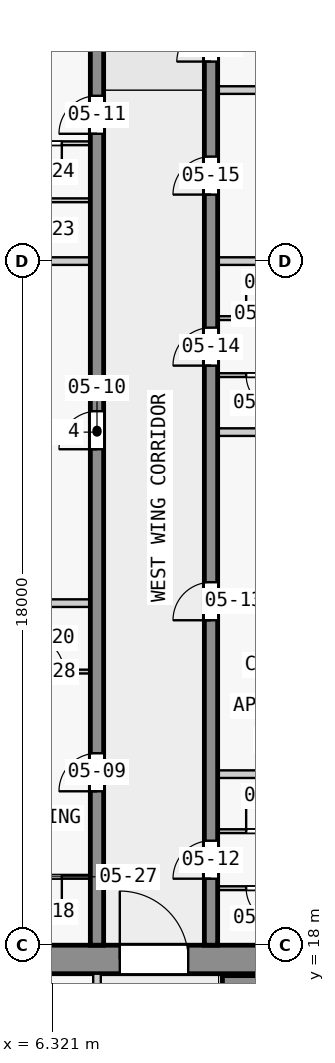
"""IFC4 building model, lengths in metres.
Left out: names, types, materials, properties, quantities, classifications, styles, units other than length and angle.
Written with IfcOpenShell. Run it as: python <this file> out.ifc"""

import sys

from ifc_helpers import new_model, si_unit, direction, frame, frame_2d, origin, place, context, subcontext, project, spatial, rectangle, extrude, element, fill, save


model = new_model("IFC4")
c1 = context("Model", 3, precision=1e-05, world=origin(), true_north=direction((0.0, 1.0)))
c2 = subcontext(c1, "Body", "Model", "MODEL_VIEW")
j1 = project(units=[si_unit("LENGTHUNIT", "METRE"), si_unit("PLANEANGLEUNIT", "RADIAN")], contexts=[c1])
p1 = place(None, origin())
s1 = spatial("IfcSite", under=j1, at=p1, CompositionType="ELEMENT")
p2 = place(p1, origin())
s2 = spatial("IfcBuilding", under=s1, at=p2, CompositionType="ELEMENT")
p3 = place(p2, frame((0.0, 0.0, 26.8)))
s3 = spatial("IfcBuildingStorey", under=s2, at=p3, CompositionType="ELEMENT", Elevation=26.8)
p4 = place(p3, frame((1.55, 17.625, 0.0), z_axis=(0.0, 0.0, 1.0), x_axis=(1.0, 0.0, 0.0)))
e1 = element("IfcWall", 1, at=p4, inside=s3, PredefinedType="SHEAR", context=c2, shape_type="SweptSolid", body=[
    extrude(rectangle(XDim=20.95, YDim=0.75, at=frame_2d((10.475, 0.0))), origin(), (0.0, 0.0, 1.0), 3.25),
])
p5 = place(p4, frame((6.55, 0.0, 0.0)))
e2 = element("IfcOpeningElement", 2, at=p5, cuts=e1, PredefinedType="OPENING", context=c2, shape_type="SweptSolid", body=[
    extrude(rectangle(XDim=1.8, YDim=2.1, at=frame_2d((0.9, 1.05))), frame((0.0, 0.385, 0.0), z_axis=(0.0, -1.0, 0.0), x_axis=(1.0, 0.0, 0.0)), (0.0, 0.0, 1.0), 0.77),
])
p6 = place(p3, frame((10.8, 17.05, 0.0), z_axis=(0.0, 0.0, 1.0), x_axis=(1.0, 0.0, 0.0)))
e3 = element("IfcWall", 3, at=p6, inside=s3, PredefinedType="SHEAR", context=c2, shape_type="SweptSolid", body=[
    extrude(rectangle(XDim=7.8, YDim=0.3, at=frame_2d((3.9, 0.0))), origin(), (0.0, 0.0, 1.0), 3.25),
])
p7 = place(p3, frame((7.5, 18.0, 0.0), z_axis=(0.0, 0.0, 1.0), x_axis=(0.0, 1.0, 0.0)))
e4 = element("IfcWall", 4, at=p7, inside=s3, PredefinedType="SHEAR", context=c2, shape_type="SweptSolid", body=[
    extrude(rectangle(XDim=27.0, YDim=0.35, at=frame_2d((13.5, 0.0))), origin(), (0.0, 0.0, 1.0), 3.25),
])
p8 = place(p7, frame((4.05, 0.0, 0.0)))
e5 = element("IfcOpeningElement", 5, at=p8, cuts=e4, PredefinedType="OPENING", context=c2, shape_type="SweptSolid", body=[
    extrude(rectangle(XDim=1.0, YDim=2.1, at=frame_2d((0.5, 1.05))), frame((0.0, 0.185, 0.0), z_axis=(0.0, -1.0, 0.0), x_axis=(1.0, 0.0, 0.0)), (0.0, 0.0, 1.0), 0.37),
])
p9 = place(p7, frame((13.05, 0.0, 0.0)))
e6 = element("IfcOpeningElement", 6, at=p9, cuts=e4, PredefinedType="OPENING", context=c2, shape_type="SweptSolid", body=[
    extrude(rectangle(XDim=1.0, YDim=2.1, at=frame_2d((0.5, 1.05))), frame((0.0, 0.185, 0.0), z_axis=(0.0, -1.0, 0.0), x_axis=(1.0, 0.0, 0.0)), (0.0, 0.0, 1.0), 0.37),
])
p10 = place(p7, frame((21.35, 0.0, 0.0)))
e7 = element("IfcOpeningElement", 7, at=p10, cuts=e4, PredefinedType="OPENING", context=c2, shape_type="SweptSolid", body=[
    extrude(rectangle(XDim=1.0, YDim=2.1, at=frame_2d((0.5, 1.05))), frame((0.0, 0.185, 0.0), z_axis=(0.0, -1.0, 0.0), x_axis=(1.0, 0.0, 0.0)), (0.0, 0.0, 1.0), 0.37),
])
p11 = place(p3, frame((10.5, 18.0, 0.0), z_axis=(0.0, 0.0, 1.0), x_axis=(0.0, 1.0, 0.0)))
e8 = element("IfcWall", 8, at=p11, inside=s3, PredefinedType="SHEAR", context=c2, shape_type="SweptSolid", body=[
    extrude(rectangle(XDim=27.0, YDim=0.35, at=frame_2d((13.5, 0.0))), origin(), (0.0, 0.0, 1.0), 3.25),
])
p12 = place(p11, frame((1.75, 0.0, 0.0)))
e9 = element("IfcOpeningElement", 9, at=p12, cuts=e8, PredefinedType="OPENING", context=c2, shape_type="SweptSolid", body=[
    extrude(rectangle(XDim=1.0, YDim=2.1, at=frame_2d((0.5, 1.05))), frame((0.0, 0.185, 0.0), z_axis=(0.0, -1.0, 0.0), x_axis=(1.0, 0.0, 0.0)), (0.0, 0.0, 1.0), 0.37),
])
p13 = place(p11, frame((8.55, 0.0, 0.0)))
e10 = element("IfcOpeningElement", 10, at=p13, cuts=e8, PredefinedType="OPENING", context=c2, shape_type="SweptSolid", body=[
    extrude(rectangle(XDim=1.0, YDim=2.1, at=frame_2d((0.5, 1.05))), frame((0.0, 0.185, 0.0), z_axis=(0.0, -1.0, 0.0), x_axis=(1.0, 0.0, 0.0)), (0.0, 0.0, 1.0), 0.37),
])
p14 = place(p11, frame((15.25, 0.0, 0.0)))
e11 = element("IfcOpeningElement", 11, at=p14, cuts=e8, PredefinedType="OPENING", context=c2, shape_type="SweptSolid", body=[
    extrude(rectangle(XDim=1.0, YDim=2.1, at=frame_2d((0.5, 1.05))), frame((0.0, 0.185, 0.0), z_axis=(0.0, -1.0, 0.0), x_axis=(1.0, 0.0, 0.0)), (0.0, 0.0, 1.0), 0.37),
])
p15 = place(p11, frame((19.75, 0.0, 0.0)))
e12 = element("IfcOpeningElement", 12, at=p15, cuts=e8, PredefinedType="OPENING", context=c2, shape_type="SweptSolid", body=[
    extrude(rectangle(XDim=1.0, YDim=2.1, at=frame_2d((0.5, 1.05))), frame((0.0, 0.185, 0.0), z_axis=(0.0, -1.0, 0.0), x_axis=(1.0, 0.0, 0.0)), (0.0, 0.0, 1.0), 0.37),
])
p16 = place(p11, frame((23.25, 0.0, 0.0)))
e13 = element("IfcOpeningElement", 13, at=p16, cuts=e8, PredefinedType="OPENING", context=c2, shape_type="SweptSolid", body=[
    extrude(rectangle(XDim=0.9, YDim=2.1, at=frame_2d((0.45, 1.05))), frame((0.0, 0.185, 0.0), z_axis=(0.0, -1.0, 0.0), x_axis=(1.0, 0.0, 0.0)), (0.0, 0.0, 1.0), 0.37),
])
p17 = place(p11, frame((25.45, 0.0, 0.0)))
e14 = element("IfcOpeningElement", 14, at=p17, cuts=e8, PredefinedType="OPENING", context=c2, shape_type="SweptSolid", body=[
    extrude(rectangle(XDim=1.0, YDim=2.1, at=frame_2d((0.5, 1.05))), frame((0.0, 0.185, 0.0), z_axis=(0.0, -1.0, 0.0), x_axis=(1.0, 0.0, 0.0)), (0.0, 0.0, 1.0), 0.37),
])
p18 = place(p3, frame((7.5, 10.1, 0.0), z_axis=(0.0, 0.0, 1.0), x_axis=(0.0, 1.0, 0.0)))
e15 = element("IfcWall", 15, at=p18, inside=s3, PredefinedType="PARTITIONING", context=c2, shape_type="SweptSolid", body=[
    extrude(rectangle(XDim=7.15, YDim=0.2, at=frame_2d((3.575, 0.0))), origin(), (0.0, 0.0, 1.0), 3.25),
])
p19 = place(p18, frame((1.05, 0.0, 0.0)))
e16 = element("IfcOpeningElement", 16, at=p19, cuts=e15, PredefinedType="OPENING", context=c2, shape_type="SweptSolid", body=[
    extrude(rectangle(XDim=0.9, YDim=2.1, at=frame_2d((0.45, 1.05))), frame((0.0, 0.11, 0.0), z_axis=(0.0, -1.0, 0.0), x_axis=(1.0, 0.0, 0.0)), (0.0, 0.0, 1.0), 0.22),
])
p20 = place(p18, frame((4.625, 0.0, 0.0)))
e17 = element("IfcOpeningElement", 17, at=p20, cuts=e15, PredefinedType="OPENING", context=c2, shape_type="SweptSolid", body=[
    extrude(rectangle(XDim=0.9, YDim=2.1, at=frame_2d((0.45, 1.05))), frame((0.0, 0.11, 0.0), z_axis=(0.0, -1.0, 0.0), x_axis=(1.0, 0.0, 0.0)), (0.0, 0.0, 1.0), 0.22),
])
p21 = place(p3, frame((13.075, 19.5, 0.0), z_axis=(0.0, 0.0, 1.0), x_axis=(-1.0, 0.0, 0.0)))
e18 = element("IfcWall", 18, at=p21, inside=s3, PredefinedType="PARTITIONING", context=c2, shape_type="SweptSolid", body=[
    extrude(rectangle(XDim=2.4, YDim=0.1, at=frame_2d((1.2, 0.0))), origin(), (0.0, 0.0, 1.0), 3.25),
])
p22 = place(p21, frame((0.75, 0.0, 0.0)))
e19 = element("IfcOpeningElement", 19, at=p22, cuts=e18, PredefinedType="OPENING", context=c2, shape_type="SweptSolid", body=[
    extrude(rectangle(XDim=0.9, YDim=2.1, at=frame_2d((0.45, 1.05))), frame((0.0, 0.06, 0.0), z_axis=(0.0, -1.0, 0.0), x_axis=(1.0, 0.0, 0.0)), (0.0, 0.0, 1.0), 0.12),
])
p23 = place(p3, frame((7.325, 19.8, 0.0), z_axis=(0.0, 0.0, 1.0), x_axis=(-1.0, 0.0, 0.0)))
e20 = element("IfcWall", 20, at=p23, inside=s3, PredefinedType="PARTITIONING", context=c2, shape_type="SweptSolid", body=[
    extrude(rectangle(XDim=2.4, YDim=0.1, at=frame_2d((1.2, 0.0))), origin(), (0.0, 0.0, 1.0), 3.25),
])
p24 = place(p23, frame((0.75, 0.0, 0.0)))
e21 = element("IfcOpeningElement", 21, at=p24, cuts=e20, PredefinedType="OPENING", context=c2, shape_type="SweptSolid", body=[
    extrude(rectangle(XDim=0.9, YDim=2.1, at=frame_2d((0.45, 1.05))), frame((0.0, 0.06, 0.0), z_axis=(0.0, -1.0, 0.0), x_axis=(1.0, 0.0, 0.0)), (0.0, 0.0, 1.0), 0.12),
])
p25 = place(p3, frame((10.675, 21.0, 0.0), z_axis=(0.0, 0.0, 1.0), x_axis=(1.0, 0.0, 0.0)))
e22 = element("IfcWall", 22, at=p25, inside=s3, PredefinedType="PARTITIONING", context=c2, shape_type="SweptSolid", body=[
    extrude(rectangle(XDim=2.4, YDim=0.1, at=frame_2d((1.2, 0.0))), origin(), (0.0, 0.0, 1.0), 3.25),
])
p26 = place(p25, frame((0.75, 0.0, 0.0)))
e23 = element("IfcOpeningElement", 23, at=p26, cuts=e22, PredefinedType="OPENING", context=c2, shape_type="SweptSolid", body=[
    extrude(rectangle(XDim=0.9, YDim=2.1, at=frame_2d((0.45, 1.05))), frame((0.0, 0.06, 0.0), z_axis=(0.0, -1.0, 0.0), x_axis=(1.0, 0.0, 0.0)), (0.0, 0.0, 1.0), 0.12),
])
p27 = place(p3, frame((12.975, 22.5, 0.0), z_axis=(0.0, 0.0, 1.0), x_axis=(-1.0, 0.0, 0.0)))
e24 = element("IfcWall", 24, at=p27, inside=s3, PredefinedType="PARTITIONING", context=c2, shape_type="SweptSolid", body=[
    extrude(rectangle(XDim=2.3, YDim=0.2, at=frame_2d((1.15, 0.0))), origin(), (0.0, 0.0, 1.0), 3.25),
])
p28 = place(p3, frame((4.975, 25.2, 0.0), z_axis=(0.0, 0.0, 1.0), x_axis=(1.0, 0.0, 0.0)))
e25 = element("IfcWall", 25, at=p28, inside=s3, PredefinedType="PARTITIONING", context=c2, shape_type="SweptSolid", body=[
    extrude(rectangle(XDim=2.35, YDim=0.1, at=frame_2d((1.175, 0.0))), origin(), (0.0, 0.0, 1.0), 3.25),
])
p29 = place(p28, frame((0.75, 0.0, 0.0)))
e26 = element("IfcOpeningElement", 26, at=p29, cuts=e25, PredefinedType="OPENING", context=c2, shape_type="SweptSolid", body=[
    extrude(rectangle(XDim=0.9, YDim=2.1, at=frame_2d((0.45, 1.05))), frame((0.0, 0.06, 0.0), z_axis=(0.0, -1.0, 0.0), x_axis=(1.0, 0.0, 0.0)), (0.0, 0.0, 1.0), 0.12),
])
for number, where, z_axis, x_axis in (
    (27, (7.325, 27.0, 0.0), (0.0, 0.0, 1.0), (-1.0, 0.0, 0.0)),
    (28, (18.08, 31.5, 0.0), (0.0, 0.0, 1.0), (-1.0, 0.0, 0.0)),
):
    element("IfcWall", number, at=place(p3, frame(where, z_axis=z_axis, x_axis=x_axis)), inside=s3, PredefinedType="PARTITIONING", context=c2, shape_type="SweptSolid", body=[
        extrude(rectangle(XDim=7.405, YDim=0.2, at=frame_2d((3.703, 0.0))), origin(), (0.0, 0.0, 1.0), 3.25),
    ])
p30 = place(p3, frame((13.075, 33.0, 0.0), z_axis=(0.0, 0.0, 1.0), x_axis=(-1.0, 0.0, 0.0)))
e29 = element("IfcWall", 29, at=p30, inside=s3, PredefinedType="PARTITIONING", context=c2, shape_type="SweptSolid", body=[
    extrude(rectangle(XDim=2.4, YDim=0.1, at=frame_2d((1.2, 0.0))), origin(), (0.0, 0.0, 1.0), 3.25),
])
p31 = place(p30, frame((0.75, 0.0, 0.0)))
e30 = element("IfcOpeningElement", 30, at=p31, cuts=e29, PredefinedType="OPENING", context=c2, shape_type="SweptSolid", body=[
    extrude(rectangle(XDim=0.9, YDim=2.1, at=frame_2d((0.45, 1.05))), frame((0.0, 0.06, 0.0), z_axis=(0.0, -1.0, 0.0), x_axis=(1.0, 0.0, 0.0)), (0.0, 0.0, 1.0), 0.12),
])
p32 = place(p3, frame((10.675, 34.5, 0.0), z_axis=(0.0, 0.0, 1.0), x_axis=(1.0, 0.0, 0.0)))
e31 = element("IfcWall", 31, at=p32, inside=s3, PredefinedType="PARTITIONING", context=c2, shape_type="SweptSolid", body=[
    extrude(rectangle(XDim=2.4, YDim=0.1, at=frame_2d((1.2, 0.0))), origin(), (0.0, 0.0, 1.0), 3.25),
])
p33 = place(p32, frame((0.75, 0.0, 0.0)))
e32 = element("IfcOpeningElement", 32, at=p33, cuts=e31, PredefinedType="OPENING", context=c2, shape_type="SweptSolid", body=[
    extrude(rectangle(XDim=0.9, YDim=2.1, at=frame_2d((0.45, 1.05))), frame((0.0, 0.06, 0.0), z_axis=(0.0, -1.0, 0.0), x_axis=(1.0, 0.0, 0.0)), (0.0, 0.0, 1.0), 0.12),
])
p34 = place(p3, frame((7.325, 36.0, 0.0), z_axis=(0.0, 0.0, 1.0), x_axis=(-1.0, 0.0, 0.0)))
e33 = element("IfcWall", 33, at=p34, inside=s3, PredefinedType="PARTITIONING", context=c2, shape_type="SweptSolid", body=[
    extrude(rectangle(XDim=5.925, YDim=0.2, at=frame_2d((2.962, 0.0))), origin(), (0.0, 0.0, 1.0), 3.25),
])
p35 = place(p3, frame((12.975, 36.0, 0.0), z_axis=(0.0, 0.0, 1.0), x_axis=(-1.0, 0.0, 0.0)))
e34 = element("IfcWall", 34, at=p35, inside=s3, PredefinedType="PARTITIONING", context=c2, shape_type="SweptSolid", body=[
    extrude(rectangle(XDim=2.3, YDim=0.2, at=frame_2d((1.15, 0.0))), origin(), (0.0, 0.0, 1.0), 3.25),
])
p36 = place(p3, frame((7.325, 37.6, 0.0), z_axis=(0.0, 0.0, 1.0), x_axis=(-1.0, 0.0, 0.0)))
e35 = element("IfcWall", 35, at=p36, inside=s3, PredefinedType="PARTITIONING", context=c2, shape_type="SweptSolid", body=[
    extrude(rectangle(XDim=2.35, YDim=0.1, at=frame_2d((1.175, 0.0))), origin(), (0.0, 0.0, 1.0), 3.25),
])
p37 = place(p3, frame((7.325, 39.1, 0.0), z_axis=(0.0, 0.0, 1.0), x_axis=(-1.0, 0.0, 0.0)))
e36 = element("IfcWall", 36, at=p37, inside=s3, PredefinedType="PARTITIONING", context=c2, shape_type="SweptSolid", body=[
    extrude(rectangle(XDim=2.35, YDim=0.1, at=frame_2d((1.175, 0.0))), origin(), (0.0, 0.0, 1.0), 3.25),
])
p38 = place(p37, frame((0.75, 0.0, 0.0)))
e37 = element("IfcOpeningElement", 37, at=p38, cuts=e36, PredefinedType="OPENING", context=c2, shape_type="SweptSolid", body=[
    extrude(rectangle(XDim=0.9, YDim=2.1, at=frame_2d((0.45, 1.05))), frame((0.0, 0.06, 0.0), z_axis=(0.0, -1.0, 0.0), x_axis=(1.0, 0.0, 0.0)), (0.0, 0.0, 1.0), 0.12),
])
p39 = place(p3, frame((18.08, 40.5, 0.0), z_axis=(0.0, 0.0, 1.0), x_axis=(-1.0, 0.0, 0.0)))
e38 = element("IfcWall", 38, at=p39, inside=s3, PredefinedType="PARTITIONING", context=c2, shape_type="SweptSolid", body=[
    extrude(rectangle(XDim=7.405, YDim=0.2, at=frame_2d((3.703, 0.0))), origin(), (0.0, 0.0, 1.0), 3.25),
])
p40 = place(p5, origin())
e39 = element("IfcDoor", 39, at=p40, inside=s3, OperationType="DOUBLE_DOOR_SINGLE_SWING", PredefinedType="DOOR", context=c2, shape_type="SweptSolid", body=[
    extrude(rectangle(XDim=1.8, YDim=2.1, at=frame_2d((0.9, 1.05))), frame((0.0, 0.025, 0.0), z_axis=(0.0, -1.0, 0.0), x_axis=(1.0, 0.0, 0.0)), (0.0, 0.0, 1.0), 0.05),
])
fill(e2, e39)
p41 = place(p8, origin())
e40 = element("IfcDoor", 40, at=p41, inside=s3, OperationType="SINGLE_SWING_LEFT", PredefinedType="DOOR", context=c2, shape_type="SweptSolid", body=[
    extrude(rectangle(XDim=1.0, YDim=2.1, at=frame_2d((0.5, 1.05))), frame((0.0, 0.025, 0.0), z_axis=(0.0, -1.0, 0.0), x_axis=(1.0, 0.0, 0.0)), (0.0, 0.0, 1.0), 0.05),
])
fill(e5, e40)
p42 = place(p9, origin())
e41 = element("IfcDoor", 41, at=p42, inside=s3, OperationType="SINGLE_SWING_RIGHT", PredefinedType="DOOR", context=c2, shape_type="SweptSolid", body=[
    extrude(rectangle(XDim=1.0, YDim=2.1, at=frame_2d((0.5, 1.05))), frame((0.0, 0.025, 0.0), z_axis=(0.0, -1.0, 0.0), x_axis=(1.0, 0.0, 0.0)), (0.0, 0.0, 1.0), 0.05),
])
fill(e6, e41)
p43 = place(p10, origin())
e42 = element("IfcDoor", 42, at=p43, inside=s3, OperationType="SINGLE_SWING_RIGHT", PredefinedType="DOOR", context=c2, shape_type="SweptSolid", body=[
    extrude(rectangle(XDim=1.0, YDim=2.1, at=frame_2d((0.5, 1.05))), frame((0.0, 0.025, 0.0), z_axis=(0.0, -1.0, 0.0), x_axis=(1.0, 0.0, 0.0)), (0.0, 0.0, 1.0), 0.05),
])
fill(e7, e42)
p44 = place(p12, origin())
e43 = element("IfcDoor", 43, at=p44, inside=s3, OperationType="SINGLE_SWING_LEFT", PredefinedType="DOOR", context=c2, shape_type="SweptSolid", body=[
    extrude(rectangle(XDim=1.0, YDim=2.1, at=frame_2d((0.5, 1.05))), frame((0.0, 0.025, 0.0), z_axis=(0.0, -1.0, 0.0), x_axis=(1.0, 0.0, 0.0)), (0.0, 0.0, 1.0), 0.05),
])
fill(e9, e43)
p45 = place(p13, origin())
e44 = element("IfcDoor", 44, at=p45, inside=s3, OperationType="SINGLE_SWING_LEFT", PredefinedType="DOOR", context=c2, shape_type="SweptSolid", body=[
    extrude(rectangle(XDim=1.0, YDim=2.1, at=frame_2d((0.5, 1.05))), frame((0.0, 0.025, 0.0), z_axis=(0.0, -1.0, 0.0), x_axis=(1.0, 0.0, 0.0)), (0.0, 0.0, 1.0), 0.05),
])
fill(e10, e44)
p46 = place(p14, origin())
e45 = element("IfcDoor", 45, at=p46, inside=s3, OperationType="SINGLE_SWING_RIGHT", PredefinedType="DOOR", context=c2, shape_type="SweptSolid", body=[
    extrude(rectangle(XDim=1.0, YDim=2.1, at=frame_2d((0.5, 1.05))), frame((0.0, 0.025, 0.0), z_axis=(0.0, -1.0, 0.0), x_axis=(1.0, 0.0, 0.0)), (0.0, 0.0, 1.0), 0.05),
])
fill(e11, e45)
p47 = place(p15, origin())
e46 = element("IfcDoor", 46, at=p47, inside=s3, OperationType="SINGLE_SWING_RIGHT", PredefinedType="DOOR", context=c2, shape_type="SweptSolid", body=[
    extrude(rectangle(XDim=1.0, YDim=2.1, at=frame_2d((0.5, 1.05))), frame((0.0, 0.025, 0.0), z_axis=(0.0, -1.0, 0.0), x_axis=(1.0, 0.0, 0.0)), (0.0, 0.0, 1.0), 0.05),
])
fill(e12, e46)
p48 = place(p16, origin())
e47 = element("IfcDoor", 47, at=p48, inside=s3, OperationType="SINGLE_SWING_RIGHT", PredefinedType="DOOR", context=c2, shape_type="SweptSolid", body=[
    extrude(rectangle(XDim=0.9, YDim=2.1, at=frame_2d((0.45, 1.05))), frame((0.0, 0.025, 0.0), z_axis=(0.0, -1.0, 0.0), x_axis=(1.0, 0.0, 0.0)), (0.0, 0.0, 1.0), 0.05),
])
fill(e13, e47)
p49 = place(p24, origin())
e48 = element("IfcDoor", 48, at=p49, inside=s3, OperationType="SINGLE_SWING_LEFT", PredefinedType="DOOR", context=c2, shape_type="SweptSolid", body=[
    extrude(rectangle(XDim=0.9, YDim=2.1, at=frame_2d((0.45, 1.05))), frame((0.0, 0.025, 0.0), z_axis=(0.0, -1.0, 0.0), x_axis=(1.0, 0.0, 0.0)), (0.0, 0.0, 1.0), 0.05),
])
fill(e21, e48)
p50 = place(p29, origin())
e49 = element("IfcDoor", 49, at=p50, inside=s3, OperationType="SINGLE_SWING_RIGHT", PredefinedType="DOOR", context=c2, shape_type="SweptSolid", body=[
    extrude(rectangle(XDim=0.9, YDim=2.1, at=frame_2d((0.45, 1.05))), frame((0.0, 0.025, 0.0), z_axis=(0.0, -1.0, 0.0), x_axis=(1.0, 0.0, 0.0)), (0.0, 0.0, 1.0), 0.05),
])
fill(e26, e49)
p51 = place(p38, origin())
e50 = element("IfcDoor", 50, at=p51, inside=s3, OperationType="SINGLE_SWING_RIGHT", PredefinedType="DOOR", context=c2, shape_type="SweptSolid", body=[
    extrude(rectangle(XDim=0.9, YDim=2.1, at=frame_2d((0.45, 1.05))), frame((0.0, 0.025, 0.0), z_axis=(0.0, -1.0, 0.0), x_axis=(1.0, 0.0, 0.0)), (0.0, 0.0, 1.0), 0.05),
])
fill(e37, e50)
p52 = place(p22, origin())
e51 = element("IfcDoor", 51, at=p52, inside=s3, OperationType="SINGLE_SWING_RIGHT", PredefinedType="DOOR", context=c2, shape_type="SweptSolid", body=[
    extrude(rectangle(XDim=0.9, YDim=2.1, at=frame_2d((0.45, 1.05))), frame((0.0, 0.025, 0.0), z_axis=(0.0, -1.0, 0.0), x_axis=(1.0, 0.0, 0.0)), (0.0, 0.0, 1.0), 0.05),
])
fill(e19, e51)
p53 = place(p26, origin())
e52 = element("IfcDoor", 52, at=p53, inside=s3, OperationType="SINGLE_SWING_RIGHT", PredefinedType="DOOR", context=c2, shape_type="SweptSolid", body=[
    extrude(rectangle(XDim=0.9, YDim=2.1, at=frame_2d((0.45, 1.05))), frame((0.0, 0.025, 0.0), z_axis=(0.0, -1.0, 0.0), x_axis=(1.0, 0.0, 0.0)), (0.0, 0.0, 1.0), 0.05),
])
fill(e23, e52)
p54 = place(p31, origin())
e53 = element("IfcDoor", 53, at=p54, inside=s3, OperationType="SINGLE_SWING_RIGHT", PredefinedType="DOOR", context=c2, shape_type="SweptSolid", body=[
    extrude(rectangle(XDim=0.9, YDim=2.1, at=frame_2d((0.45, 1.05))), frame((0.0, 0.025, 0.0), z_axis=(0.0, -1.0, 0.0), x_axis=(1.0, 0.0, 0.0)), (0.0, 0.0, 1.0), 0.05),
])
fill(e30, e53)
p55 = place(p33, origin())
e54 = element("IfcDoor", 54, at=p55, inside=s3, OperationType="SINGLE_SWING_RIGHT", PredefinedType="DOOR", context=c2, shape_type="SweptSolid", body=[
    extrude(rectangle(XDim=0.9, YDim=2.1, at=frame_2d((0.45, 1.05))), frame((0.0, 0.025, 0.0), z_axis=(0.0, -1.0, 0.0), x_axis=(1.0, 0.0, 0.0)), (0.0, 0.0, 1.0), 0.05),
])
fill(e32, e54)
save(model, sys.argv[1])
